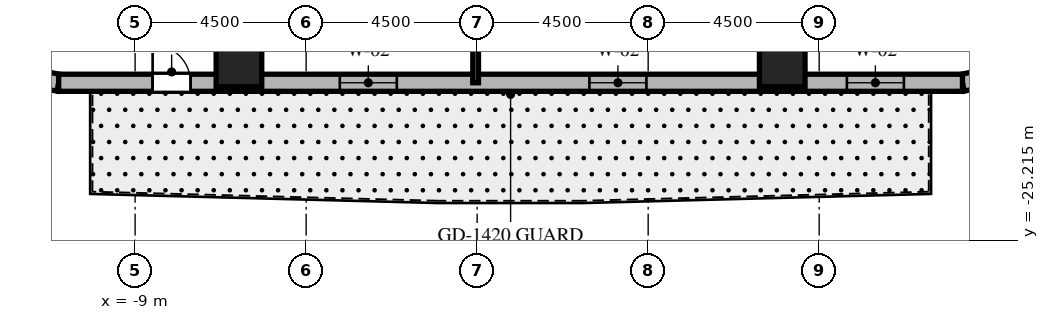
"""IFC4 building model, lengths in metres.
Left out: names, types, materials, properties, quantities, classifications, styles, units other than length and angle.
Written with IfcOpenShell. Run it as: python <this file> out.ifc"""

import sys

from ifc_helpers import new_model, si_unit, direction, frame, frame_2d, origin, origin_2d, place, context, subcontext, project, spatial, rectangle, extrude, element, fill, save


model = new_model("IFC4")
c1 = context("Model", 3, precision=1e-05, world=origin(), true_north=direction((0.0, 1.0)))
c2 = subcontext(c1, "Body", "Model", "MODEL_VIEW")
j1 = project(units=[si_unit("LENGTHUNIT", "METRE"), si_unit("PLANEANGLEUNIT", "RADIAN")], contexts=[c1])
p1 = place(None, origin())
s1 = spatial("IfcSite", under=j1, at=p1, CompositionType="ELEMENT")
p2 = place(p1, origin())
s2 = spatial("IfcBuilding", under=s1, at=p2, CompositionType="ELEMENT")
p3 = place(p2, frame((0.0, 0.0, 102.5)))
s3 = spatial("IfcBuildingStorey", under=s2, at=p3, CompositionType="ELEMENT", Elevation=102.5)
for number, where, z_axis, x_axis in (
    (1, (-6.268, -20.58, 0.0), (0.0, 0.0, 1.0), (1.0, 0.0, 0.0)),
    (2, (8.028, -20.58, 0.0), (0.0, 0.0, 1.0), (1.0, 0.0, 0.0)),
):
    element("IfcColumn", number, at=place(p3, frame(where, z_axis=z_axis, x_axis=x_axis)), inside=s3, PredefinedType="COLUMN", context=c2, shape_type="SweptSolid", body=[
        extrude(rectangle(XDim=1.2, YDim=1.2, at=origin_2d()), origin(), (0.0, 0.0, 1.0), 3.7),
    ])
p4 = place(p3, frame((-12.259, -20.84, 0.0), z_axis=(0.0, 0.0, 1.0), x_axis=(0.982730354425, -0.185043374624, 0.0)))
e3 = element("IfcWall", 3, at=p4, inside=s3, PredefinedType="SOLIDWALL", context=c2, shape_type="SweptSolid", body=[
    extrude(rectangle(XDim=1.269, YDim=0.45, at=frame_2d((0.635, 0.0))), origin(), (0.0, 0.0, 1.0), 3.4),
])
p5 = place(p3, frame((12.771, -21.075, 0.0), z_axis=(0.0, 0.0, 1.0), x_axis=(0.97874281988, 0.205091424819, 0.0)))
e4 = element("IfcWall", 4, at=p5, inside=s3, PredefinedType="SOLIDWALL", context=c2, shape_type="SweptSolid", body=[
    extrude(rectangle(XDim=1.406, YDim=0.45, at=frame_2d((0.703, 0.0))), origin(), (0.0, 0.0, 1.0), 3.4),
])
p6 = place(p3, frame((-11.012, -21.075, 0.0), z_axis=(0.0, 0.0, 1.0), x_axis=(1.0, 0.0, 0.0)))
e5 = element("IfcWall", 5, at=p6, inside=s3, PredefinedType="SOLIDWALL", context=c2, shape_type="SweptSolid", body=[
    extrude(rectangle(XDim=23.782, YDim=0.45, at=frame_2d((11.891, 0.0))), origin(), (0.0, 0.0, 1.0), 3.4),
])
p7 = place(p6, frame((2.473, 0.0, 0.0)))
e6 = element("IfcOpeningElement", 6, at=p7, cuts=e5, PredefinedType="OPENING", context=c2, shape_type="SweptSolid", body=[
    extrude(rectangle(XDim=1.0, YDim=2.15, at=frame_2d((0.5, 1.075))), frame((0.0, 0.235, 0.0), z_axis=(0.0, -1.0, 0.0), x_axis=(1.0, 0.0, 0.0)), (0.0, 0.0, 1.0), 0.47),
])
p8 = place(p6, frame((7.398, 0.0, 0.8)))
e7 = element("IfcOpeningElement", 7, at=p8, cuts=e5, PredefinedType="OPENING", context=c2, shape_type="SweptSolid", body=[
    extrude(rectangle(XDim=1.5, YDim=1.8, at=frame_2d((0.75, 0.9))), frame((0.0, 0.235, 0.0), z_axis=(0.0, -1.0, 0.0), x_axis=(1.0, 0.0, 0.0)), (0.0, 0.0, 1.0), 0.47),
])
p9 = place(p6, frame((13.966, 0.0, 0.8)))
e8 = element("IfcOpeningElement", 8, at=p9, cuts=e5, PredefinedType="OPENING", context=c2, shape_type="SweptSolid", body=[
    extrude(rectangle(XDim=1.5, YDim=1.8, at=frame_2d((0.75, 0.9))), frame((0.0, 0.235, 0.0), z_axis=(0.0, -1.0, 0.0), x_axis=(1.0, 0.0, 0.0)), (0.0, 0.0, 1.0), 0.47),
])
p10 = place(p6, frame((20.741, 0.0, 0.8)))
e9 = element("IfcOpeningElement", 9, at=p10, cuts=e5, PredefinedType="OPENING", context=c2, shape_type="SweptSolid", body=[
    extrude(rectangle(XDim=1.5, YDim=1.8, at=frame_2d((0.75, 0.9))), frame((0.0, 0.235, 0.0), z_axis=(0.0, -1.0, 0.0), x_axis=(1.0, 0.0, 0.0)), (0.0, 0.0, 1.0), 0.47),
])
p11 = place(p3, frame((-3.0, -9.85, 0.0), z_axis=(0.0, 0.0, 1.0), x_axis=(-0.291352035382, -0.95661590593, 0.0)))
e10 = element("IfcWall", 10, at=p11, inside=s3, PredefinedType="PARTITIONING", context=c2, shape_type="SweptSolid", body=[
    extrude(rectangle(XDim=11.734, YDim=0.15, at=frame_2d((5.867, 0.0))), origin(), (0.0, 0.0, 1.0), 2.54),
])
p12 = place(p3, frame((-0.019, -9.85, 0.0), z_axis=(0.0, 0.0, 1.0), x_axis=(-0.001913996973, -0.999998168306, 0.0)))
e11 = element("IfcWall", 11, at=p12, inside=s3, PredefinedType="PARTITIONING", context=c2, shape_type="SweptSolid", body=[
    extrude(rectangle(XDim=11.225, YDim=0.15, at=frame_2d((5.612, 0.0))), origin(), (0.0, 0.0, 1.0), 2.54),
])
p13 = place(p3, frame((3.842, -9.85, 0.0), z_axis=(0.0, 0.0, 1.0), x_axis=(0.363432685593, -0.931620460833, 0.0)))
e12 = element("IfcWall", 12, at=p13, inside=s3, PredefinedType="PARTITIONING", context=c2, shape_type="SweptSolid", body=[
    extrude(rectangle(XDim=12.049, YDim=0.15, at=frame_2d((6.024, 0.0))), origin(), (0.0, 0.0, 1.0), 2.54),
])
p14 = place(p3, frame((6.861, -9.85, 0.0), z_axis=(0.0, 0.0, 1.0), x_axis=(0.571575431292, -0.820549527051, 0.0)))
e13 = element("IfcWall", 13, at=p14, inside=s3, PredefinedType="PARTITIONING", context=c2, shape_type="SweptSolid", body=[
    extrude(rectangle(XDim=12.975, YDim=0.15, at=frame_2d((6.488, 0.0))), origin(), (0.0, 0.0, 1.0), 2.54),
])
p15 = place(p7, origin())
e14 = element("IfcDoor", 14, at=p15, inside=s3, OperationType="SINGLE_SWING_LEFT", PredefinedType="DOOR", context=c2, shape_type="SweptSolid", body=[
    extrude(rectangle(XDim=1.0, YDim=2.15, at=frame_2d((0.5, 1.075))), frame((0.0, 0.025, 0.0), z_axis=(0.0, -1.0, 0.0), x_axis=(1.0, 0.0, 0.0)), (0.0, 0.0, 1.0), 0.05),
])
fill(e6, e14)
p16 = place(p8, origin())
e15 = element("IfcWindow", 15, at=p16, inside=s3, PartitioningType="SINGLE_PANEL", PredefinedType="WINDOW", context=c2, shape_type="SweptSolid", body=[
    extrude(rectangle(XDim=1.5, YDim=1.8, at=frame_2d((0.75, 0.9))), frame((0.0, 0.03, 0.0), z_axis=(0.0, -1.0, 0.0), x_axis=(1.0, 0.0, 0.0)), (0.0, 0.0, 1.0), 0.06),
])
fill(e7, e15)
p17 = place(p9, origin())
e16 = element("IfcWindow", 16, at=p17, inside=s3, PartitioningType="SINGLE_PANEL", PredefinedType="WINDOW", context=c2, shape_type="SweptSolid", body=[
    extrude(rectangle(XDim=1.5, YDim=1.8, at=frame_2d((0.75, 0.9))), frame((0.0, 0.03, 0.0), z_axis=(0.0, -1.0, 0.0), x_axis=(1.0, 0.0, 0.0)), (0.0, 0.0, 1.0), 0.06),
])
fill(e8, e16)
p18 = place(p10, origin())
e17 = element("IfcWindow", 17, at=p18, inside=s3, PartitioningType="SINGLE_PANEL", PredefinedType="WINDOW", context=c2, shape_type="SweptSolid", body=[
    extrude(rectangle(XDim=1.5, YDim=1.8, at=frame_2d((0.75, 0.9))), frame((0.0, 0.03, 0.0), z_axis=(0.0, -1.0, 0.0), x_axis=(1.0, 0.0, 0.0)), (0.0, 0.0, 1.0), 0.06),
])
fill(e9, e17)
save(model, sys.argv[1])
